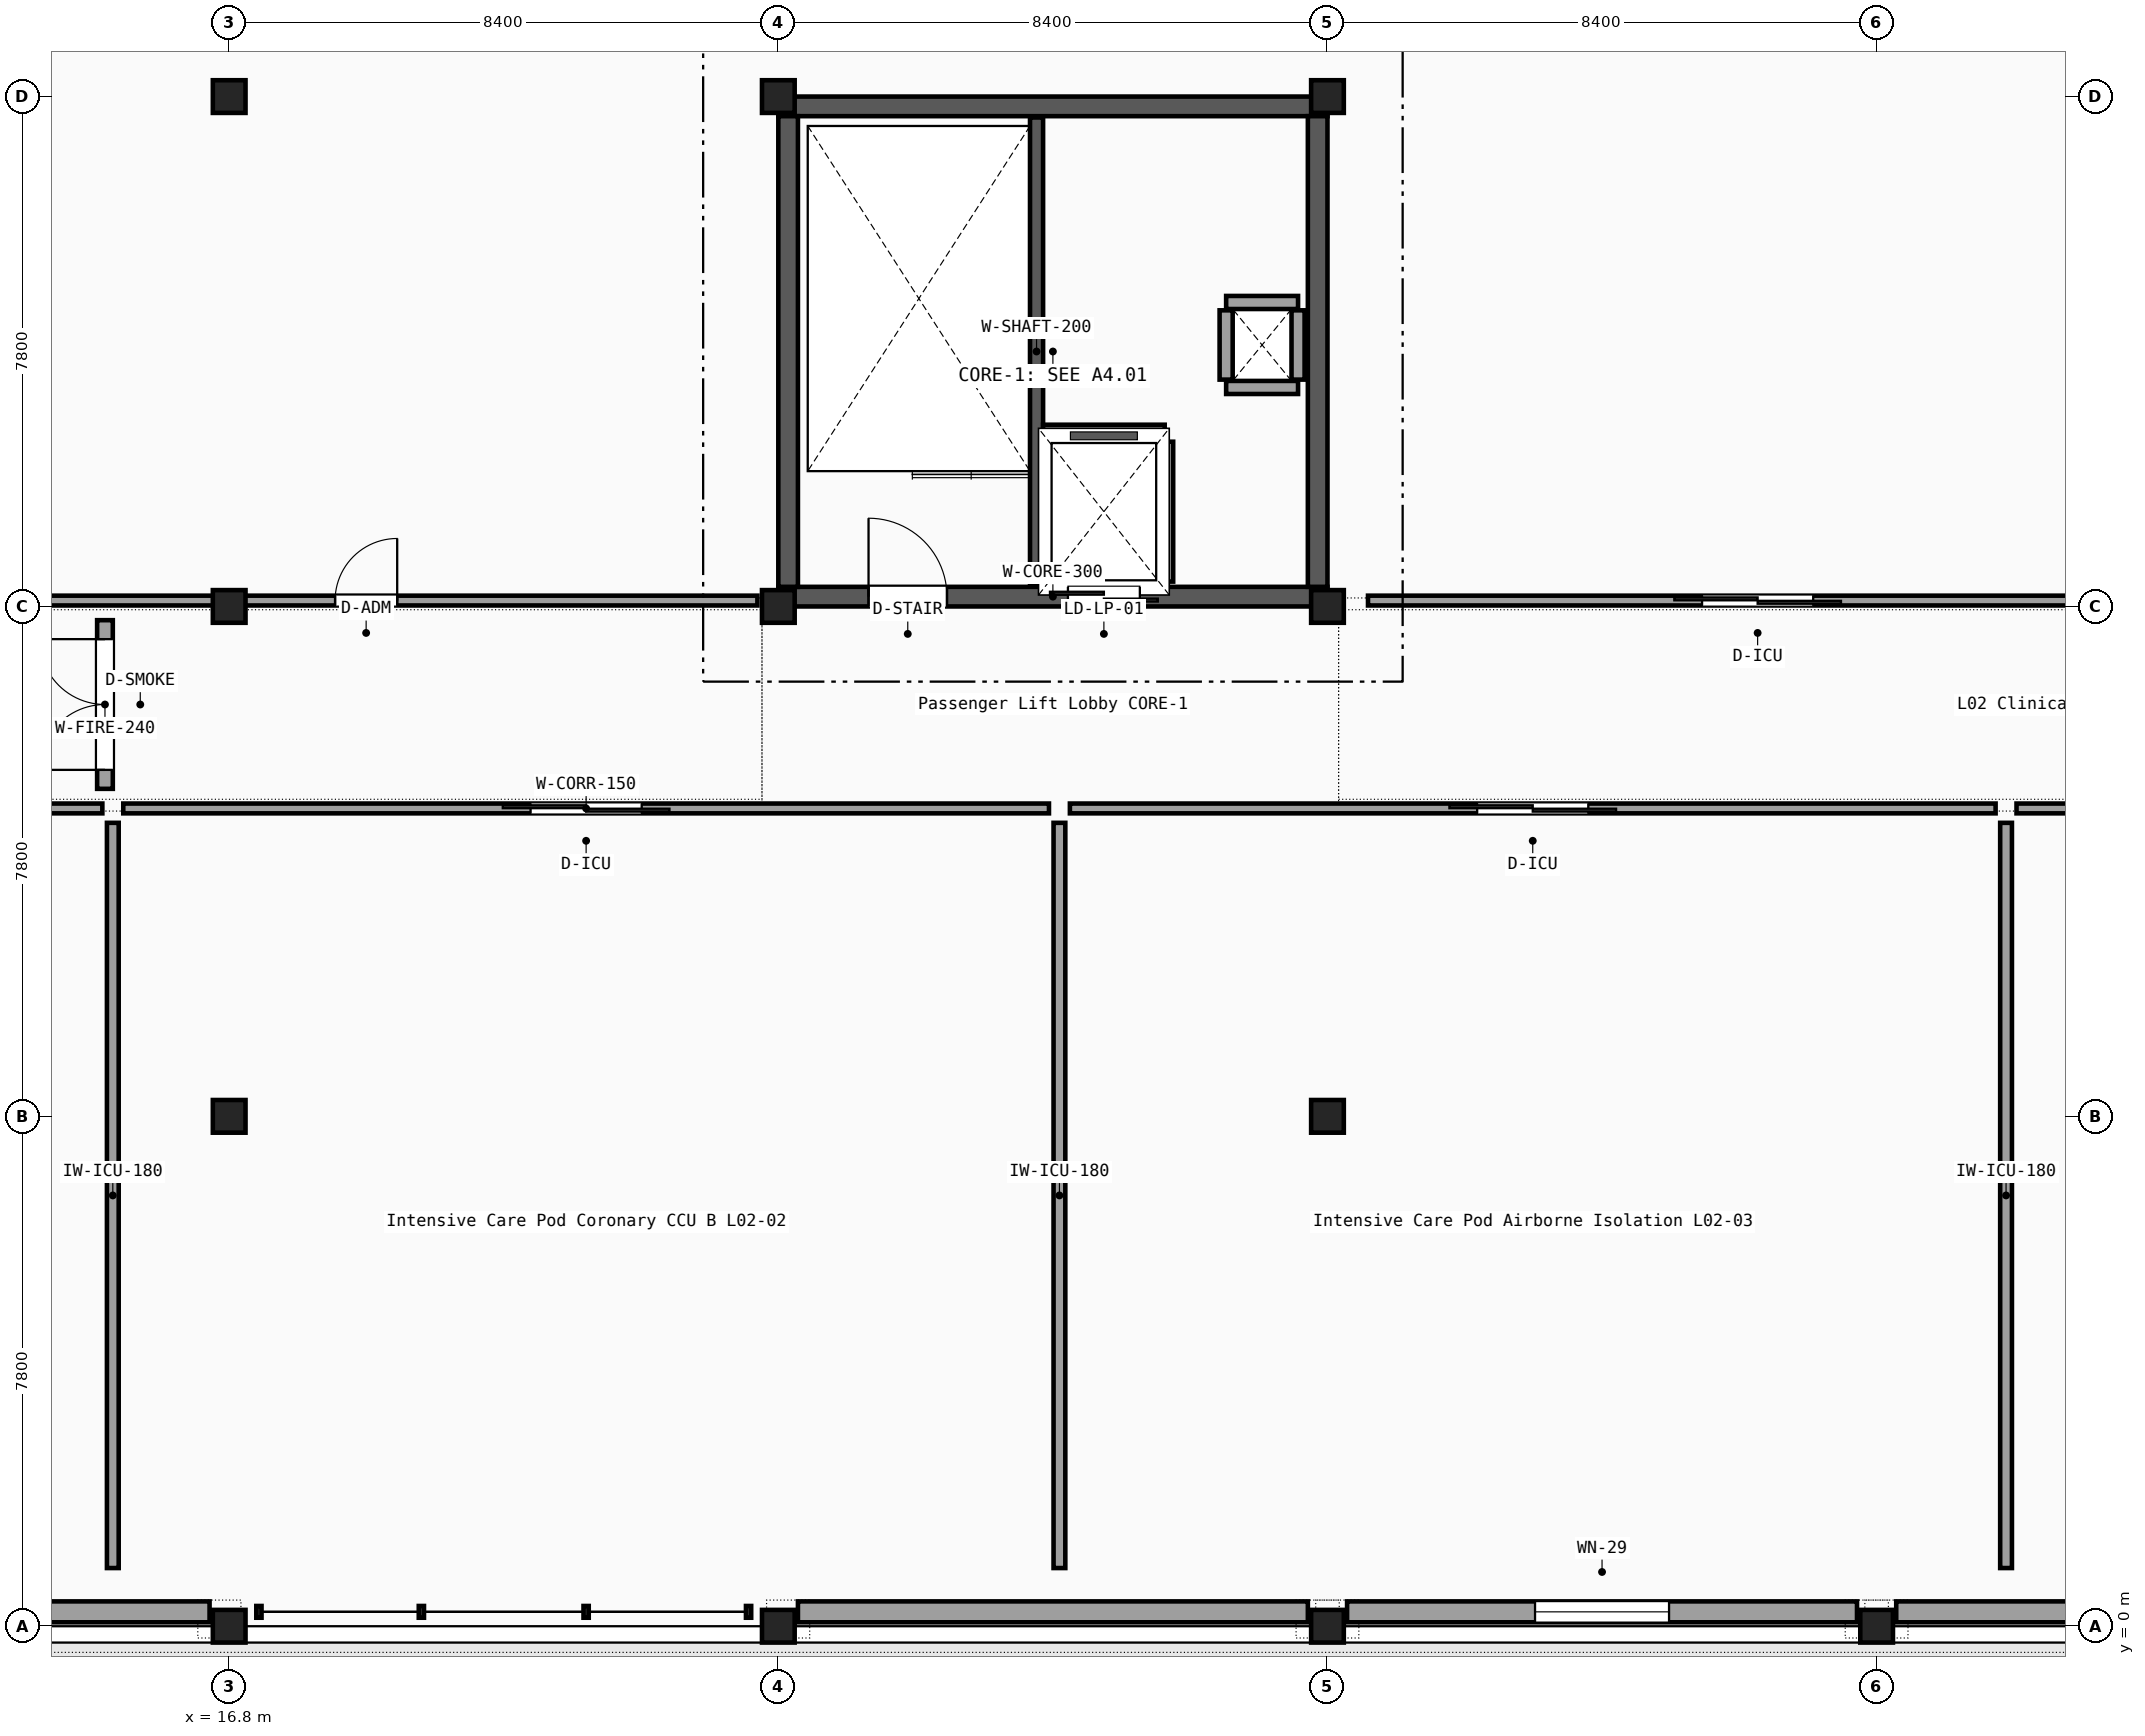
"""IFC4 building model, lengths in metres.
Left out: names, types, materials, properties, quantities, classifications, styles, units other than length and angle.
Written with IfcOpenShell. Run it as: python <this file> out.ifc"""

import sys

from ifc_helpers import new_model, si_unit, direction, frame, frame_2d, origin, origin_2d, place, context, subcontext, project, spatial, rectangle, extrude, element, fill, save


model = new_model("IFC4")
c1 = context("Model", 3, precision=1e-05, world=origin(), true_north=direction((0.0, 1.0)))
c2 = subcontext(c1, "Body", "Model", "MODEL_VIEW")
j1 = project(units=[si_unit("LENGTHUNIT", "METRE"), si_unit("PLANEANGLEUNIT", "RADIAN")], contexts=[c1])
p1 = place(None, origin())
s1 = spatial("IfcSite", under=j1, at=p1, CompositionType="ELEMENT")
p2 = place(p1, origin())
s2 = spatial("IfcBuilding", under=s1, at=p2, CompositionType="ELEMENT")
p3 = place(p2, frame((0.0, 0.0, 10.2)))
s3 = spatial("IfcBuildingStorey", under=s2, at=p3, CompositionType="ELEMENT", Elevation=10.2)
for number, where, z_axis, x_axis in (
    (1, (16.8, 0.0, 0.0), (0.0, 0.0, 1.0), (1.0, 0.0, 0.0)),
    (2, (16.8, 7.8, 0.0), (0.0, 0.0, 1.0), (1.0, 0.0, 0.0)),
    (3, (16.8, 15.6, 0.0), (0.0, 0.0, 1.0), (1.0, 0.0, 0.0)),
    (4, (16.8, 23.4, 0.0), (0.0, 0.0, 1.0), (1.0, 0.0, 0.0)),
    (5, (25.2, 0.0, 0.0), (0.0, 0.0, 1.0), (1.0, 0.0, 0.0)),
    (6, (25.2, 15.6, 0.0), (0.0, 0.0, 1.0), (1.0, 0.0, 0.0)),
    (7, (25.2, 23.4, 0.0), (0.0, 0.0, 1.0), (1.0, 0.0, 0.0)),
    (8, (33.6, 0.0, 0.0), (0.0, 0.0, 1.0), (1.0, 0.0, 0.0)),
    (9, (33.6, 7.8, 0.0), (0.0, 0.0, 1.0), (1.0, 0.0, 0.0)),
    (10, (33.6, 15.6, 0.0), (0.0, 0.0, 1.0), (1.0, 0.0, 0.0)),
    (11, (33.6, 23.4, 0.0), (0.0, 0.0, 1.0), (1.0, 0.0, 0.0)),
    (12, (42.0, 0.0, 0.0), (0.0, 0.0, 1.0), (1.0, 0.0, 0.0)),
):
    element("IfcColumn", number, at=place(p3, frame(where, z_axis=z_axis, x_axis=x_axis)), inside=s3, PredefinedType="COLUMN", context=c2, shape_type="SweptSolid", body=[
        extrude(rectangle(XDim=0.5, YDim=0.5, at=origin_2d()), origin(), (0.0, 0.0, 1.0), 4.65),
    ])
for number, where, z_axis, x_axis in (
    (13, (8.7, 0.22, 0.0), (0.0, 0.0, 1.0), (1.0, 0.0, 0.0)),
    (14, (25.5, 0.22, 0.0), (0.0, 0.0, 1.0), (1.0, 0.0, 0.0)),
):
    element("IfcWall", number, at=place(p3, frame(where, z_axis=z_axis, x_axis=x_axis)), inside=s3, PredefinedType="SOLIDWALL", context=c2, shape_type="SweptSolid", body=[
        extrude(rectangle(XDim=7.8, YDim=0.32, at=frame_2d((3.9, 0.0))), origin(), (0.0, 0.0, 1.0), 4.04),
    ])
p4 = place(p3, frame((33.9, 0.22, 0.0), z_axis=(0.0, 0.0, 1.0), x_axis=(1.0, 0.0, 0.0)))
e15 = element("IfcWall", 15, at=p4, inside=s3, PredefinedType="SOLIDWALL", context=c2, shape_type="SweptSolid", body=[
    extrude(rectangle(XDim=7.8, YDim=0.32, at=frame_2d((3.9, 0.0))), origin(), (0.0, 0.0, 1.0), 4.04),
])
p5 = place(p4, frame((2.875, 0.0, 1.05)))
e16 = element("IfcOpeningElement", 16, at=p5, cuts=e15, PredefinedType="OPENING", context=c2, shape_type="SweptSolid", body=[
    extrude(rectangle(XDim=2.05, YDim=1.4, at=frame_2d((1.025, 0.7))), frame((0.0, 0.17, 0.0), z_axis=(0.0, -1.0, 0.0), x_axis=(1.0, 0.0, 0.0)), (0.0, 0.0, 1.0), 0.34),
])
p6 = place(p3, frame((42.3, 0.22, 0.0), z_axis=(0.0, 0.0, 1.0), x_axis=(1.0, 0.0, 0.0)))
e17 = element("IfcWall", 17, at=p6, inside=s3, PredefinedType="SOLIDWALL", context=c2, shape_type="SweptSolid", body=[
    extrude(rectangle(XDim=7.8, YDim=0.32, at=frame_2d((3.9, 0.0))), origin(), (0.0, 0.0, 1.0), 4.37),
])
p7 = place(p3, frame((25.2, 15.75, 0.0), z_axis=(0.0, 0.0, 1.0), x_axis=(1.0, 0.0, 0.0)))
e18 = element("IfcWall", 18, at=p7, inside=s3, PredefinedType="SHEAR", context=c2, shape_type="SweptSolid", body=[
    extrude(rectangle(XDim=8.4, YDim=0.3, at=frame_2d((4.2, 0.0))), origin(), (0.0, 0.0, 1.0), 4.4),
])
p8 = place(p7, frame((1.38, 0.0, 0.0)))
e19 = element("IfcOpeningElement", 19, at=p8, cuts=e18, PredefinedType="OPENING", context=c2, shape_type="SweptSolid", body=[
    extrude(rectangle(XDim=1.2, YDim=2.15, at=frame_2d((0.6, 1.075))), frame((0.0, 0.16, 0.0), z_axis=(0.0, -1.0, 0.0), x_axis=(1.0, 0.0, 0.0)), (0.0, 0.0, 1.0), 0.32),
])
p9 = place(p7, frame((4.43, 0.0, 0.0)))
e20 = element("IfcOpeningElement", 20, at=p9, cuts=e18, PredefinedType="OPENING", context=c2, shape_type="SweptSolid", body=[
    extrude(rectangle(XDim=1.1, YDim=2.15, at=frame_2d((0.55, 1.075))), frame((0.0, 0.16, 0.0), z_axis=(0.0, -1.0, 0.0), x_axis=(1.0, 0.0, 0.0)), (0.0, 0.0, 1.0), 0.32),
])
p10 = place(p3, frame((25.2, 23.25, 0.0), z_axis=(0.0, 0.0, 1.0), x_axis=(1.0, 0.0, 0.0)))
e21 = element("IfcWall", 21, at=p10, inside=s3, PredefinedType="SHEAR", context=c2, shape_type="SweptSolid", body=[
    extrude(rectangle(XDim=8.4, YDim=0.3, at=frame_2d((4.2, 0.0))), origin(), (0.0, 0.0, 1.0), 4.4),
])
for number, where, z_axis, x_axis in (
    (22, (25.35, 15.9, 0.0), (0.0, 0.0, 1.0), (0.0, 1.0, 0.0)),
    (23, (33.45, 15.9, 0.0), (0.0, 0.0, 1.0), (0.0, 1.0, 0.0)),
):
    element("IfcWall", number, at=place(p3, frame(where, z_axis=z_axis, x_axis=x_axis)), inside=s3, PredefinedType="SHEAR", context=c2, shape_type="SweptSolid", body=[
        extrude(rectangle(XDim=7.2, YDim=0.3, at=frame_2d((3.6, 0.0))), origin(), (0.0, 0.0, 1.0), 4.4),
    ])
p11 = place(p3, frame((29.15, 15.92, 0.0), z_axis=(0.0, 0.0, 1.0), x_axis=(0.0, 1.0, 0.0)))
e24 = element("IfcWall", 24, at=p11, inside=s3, PredefinedType="SHEAR", context=c2, shape_type="SweptSolid", body=[
    extrude(rectangle(XDim=7.16, YDim=0.2, at=frame_2d((3.58, 0.0))), origin(), (0.0, 0.0, 1.0), 4.4),
])
for number, where, z_axis, x_axis in (
    (25, (32.05, 18.95, 0.0), (0.0, 0.0, 1.0), (1.0, 0.0, 0.0)),
    (26, (32.05, 20.25, 0.0), (0.0, 0.0, 1.0), (1.0, 0.0, 0.0)),
):
    element("IfcWall", number, at=place(p3, frame(where, z_axis=z_axis, x_axis=x_axis)), inside=s3, PredefinedType="PARTITIONING", context=c2, shape_type="SweptSolid", body=[
        extrude(rectangle(XDim=1.1, YDim=0.2, at=frame_2d((0.55, 0.0))), origin(), (0.0, 0.0, 1.0), 4.04),
    ])
for number, where, z_axis, x_axis in (
    (27, (32.05, 19.07, 0.0), (0.0, 0.0, 1.0), (0.0, 1.0, 0.0)),
    (28, (33.15, 19.07, 0.0), (0.0, 0.0, 1.0), (0.0, 1.0, 0.0)),
):
    element("IfcWall", number, at=place(p3, frame(where, z_axis=z_axis, x_axis=x_axis)), inside=s3, PredefinedType="PARTITIONING", context=c2, shape_type="SweptSolid", body=[
        extrude(rectangle(XDim=1.06, YDim=0.2, at=frame_2d((0.53, 0.0))), origin(), (0.0, 0.0, 1.0), 4.04),
    ])
p12 = place(p3, frame((31.14, 15.98, 0.0), z_axis=(0.0, 0.0, 1.0), x_axis=(0.0, 1.0, 0.0)))
e29 = element("IfcWall", 29, at=p12, inside=s3, PredefinedType="PARTITIONING", context=c2, shape_type="SweptSolid", body=[
    extrude(rectangle(XDim=2.14, YDim=0.2, at=frame_2d((1.07, 0.0))), origin(), (0.0, 0.0, 1.0), 4.04),
])
p13 = place(p3, frame((29.25, 18.28, 0.0), z_axis=(0.0, 0.0, 1.0), x_axis=(1.0, 0.0, 0.0)))
e30 = element("IfcWall", 30, at=p13, inside=s3, PredefinedType="PARTITIONING", context=c2, shape_type="SweptSolid", body=[
    extrude(rectangle(XDim=1.86, YDim=0.2, at=frame_2d((0.93, 0.0))), origin(), (0.0, 0.0, 1.0), 4.04),
])
p14 = place(p3, frame((0.62, 12.51, 0.0), z_axis=(0.0, 0.0, 1.0), x_axis=(1.0, 0.0, 0.0)))
e31 = element("IfcWall", 31, at=p14, inside=s3, PredefinedType="PARTITIONING", context=c2, shape_type="SweptSolid", body=[
    extrude(rectangle(XDim=14.24, YDim=0.15, at=frame_2d((7.12, 0.0))), origin(), (0.0, 0.0, 1.0), 4.37),
])
p15 = place(p14, frame((6.27, 0.0, 0.0)))
e32 = element("IfcOpeningElement", 32, at=p15, cuts=e31, PredefinedType="OPENING", context=c2, shape_type="SweptSolid", body=[
    extrude(rectangle(XDim=1.7, YDim=2.3, at=frame_2d((0.85, 1.15))), frame((0.0, 0.085, 0.0), z_axis=(0.0, -1.0, 0.0), x_axis=(1.0, 0.0, 0.0)), (0.0, 0.0, 1.0), 0.17),
])
p16 = place(p3, frame((15.02, 0.89, 0.0), z_axis=(0.0, 0.0, 1.0), x_axis=(0.0, 1.0, 0.0)))
e33 = element("IfcWall", 33, at=p16, inside=s3, PredefinedType="PARTITIONING", context=c2, shape_type="SweptSolid", body=[
    extrude(rectangle(XDim=11.4, YDim=0.18, at=frame_2d((5.7, 0.0))), origin(), (0.0, 0.0, 1.0), 4.37),
])
p17 = place(p3, frame((15.18, 12.51, 0.0), z_axis=(0.0, 0.0, 1.0), x_axis=(1.0, 0.0, 0.0)))
e34 = element("IfcWall", 34, at=p17, inside=s3, PredefinedType="PARTITIONING", context=c2, shape_type="SweptSolid", body=[
    extrude(rectangle(XDim=14.16, YDim=0.15, at=frame_2d((7.08, 0.0))), origin(), (0.0, 0.0, 1.0), 4.04),
])
p18 = place(p17, frame((6.23, 0.0, 0.0)))
e35 = element("IfcOpeningElement", 35, at=p18, cuts=e34, PredefinedType="OPENING", context=c2, shape_type="SweptSolid", body=[
    extrude(rectangle(XDim=1.7, YDim=2.3, at=frame_2d((0.85, 1.15))), frame((0.0, 0.085, 0.0), z_axis=(0.0, -1.0, 0.0), x_axis=(1.0, 0.0, 0.0)), (0.0, 0.0, 1.0), 0.17),
])
p19 = place(p3, frame((29.5, 0.89, 0.0), z_axis=(0.0, 0.0, 1.0), x_axis=(0.0, 1.0, 0.0)))
e36 = element("IfcWall", 36, at=p19, inside=s3, PredefinedType="PARTITIONING", context=c2, shape_type="SweptSolid", body=[
    extrude(rectangle(XDim=11.4, YDim=0.18, at=frame_2d((5.7, 0.0))), origin(), (0.0, 0.0, 1.0), 4.37),
])
p20 = place(p3, frame((29.66, 12.51, 0.0), z_axis=(0.0, 0.0, 1.0), x_axis=(1.0, 0.0, 0.0)))
e37 = element("IfcWall", 37, at=p20, inside=s3, PredefinedType="PARTITIONING", context=c2, shape_type="SweptSolid", body=[
    extrude(rectangle(XDim=14.16, YDim=0.15, at=frame_2d((7.08, 0.0))), origin(), (0.0, 0.0, 1.0), 4.04),
])
p21 = place(p20, frame((6.23, 0.0, 0.0)))
e38 = element("IfcOpeningElement", 38, at=p21, cuts=e37, PredefinedType="OPENING", context=c2, shape_type="SweptSolid", body=[
    extrude(rectangle(XDim=1.7, YDim=2.3, at=frame_2d((0.85, 1.15))), frame((0.0, 0.085, 0.0), z_axis=(0.0, -1.0, 0.0), x_axis=(1.0, 0.0, 0.0)), (0.0, 0.0, 1.0), 0.17),
])
p22 = place(p3, frame((43.98, 0.89, 0.0), z_axis=(0.0, 0.0, 1.0), x_axis=(0.0, 1.0, 0.0)))
e39 = element("IfcWall", 39, at=p22, inside=s3, PredefinedType="PARTITIONING", context=c2, shape_type="SweptSolid", body=[
    extrude(rectangle(XDim=11.4, YDim=0.18, at=frame_2d((5.7, 0.0))), origin(), (0.0, 0.0, 1.0), 4.37),
])
p23 = place(p3, frame((44.14, 12.51, 0.0), z_axis=(0.0, 0.0, 1.0), x_axis=(1.0, 0.0, 0.0)))
e40 = element("IfcWall", 40, at=p23, inside=s3, PredefinedType="PARTITIONING", context=c2, shape_type="SweptSolid", body=[
    extrude(rectangle(XDim=14.24, YDim=0.15, at=frame_2d((7.12, 0.0))), origin(), (0.0, 0.0, 1.0), 4.37),
])
p24 = place(p23, frame((6.595, 0.0, 0.0)))
e41 = element("IfcOpeningElement", 41, at=p24, cuts=e40, PredefinedType="OPENING", context=c2, shape_type="SweptSolid", body=[
    extrude(rectangle(XDim=1.05, YDim=2.15, at=frame_2d((0.525, 1.075))), frame((0.0, 0.085, 0.0), z_axis=(0.0, -1.0, 0.0), x_axis=(1.0, 0.0, 0.0)), (0.0, 0.0, 1.0), 0.17),
])
p25 = place(p3, frame((12.91, 15.69, 0.0), z_axis=(0.0, 0.0, 1.0), x_axis=(1.0, 0.0, 0.0)))
e42 = element("IfcWall", 42, at=p25, inside=s3, PredefinedType="PARTITIONING", context=c2, shape_type="SweptSolid", body=[
    extrude(rectangle(XDim=11.97, YDim=0.15, at=frame_2d((5.985, 0.0))), origin(), (0.0, 0.0, 1.0), 4.04),
])
p26 = place(p25, frame((5.51, 0.0, 0.0)))
e43 = element("IfcOpeningElement", 43, at=p26, cuts=e42, PredefinedType="OPENING", context=c2, shape_type="SweptSolid", body=[
    extrude(rectangle(XDim=0.95, YDim=2.1, at=frame_2d((0.475, 1.05))), frame((0.0, 0.085, 0.0), z_axis=(0.0, -1.0, 0.0), x_axis=(1.0, 0.0, 0.0)), (0.0, 0.0, 1.0), 0.17),
])
p27 = place(p3, frame((34.22, 15.69, 0.0), z_axis=(0.0, 0.0, 1.0), x_axis=(1.0, 0.0, 0.0)))
e44 = element("IfcWall", 44, at=p27, inside=s3, PredefinedType="PARTITIONING", context=c2, shape_type="SweptSolid", body=[
    extrude(rectangle(XDim=11.92, YDim=0.15, at=frame_2d((5.96, 0.0))), origin(), (0.0, 0.0, 1.0), 4.37),
])
p28 = place(p27, frame((5.11, 0.0, 0.0)))
e45 = element("IfcOpeningElement", 45, at=p28, cuts=e44, PredefinedType="OPENING", context=c2, shape_type="SweptSolid", body=[
    extrude(rectangle(XDim=1.7, YDim=2.3, at=frame_2d((0.85, 1.15))), frame((0.0, 0.085, 0.0), z_axis=(0.0, -1.0, 0.0), x_axis=(1.0, 0.0, 0.0)), (0.0, 0.0, 1.0), 0.17),
])
p29 = place(p3, frame((14.9, 12.81, 0.0), z_axis=(0.0, 0.0, 1.0), x_axis=(0.0, 1.0, 0.0)))
e46 = element("IfcWall", 46, at=p29, inside=s3, PredefinedType="PARTITIONING", context=c2, shape_type="SweptSolid", body=[
    extrude(rectangle(XDim=2.58, YDim=0.24, at=frame_2d((1.29, 0.0))), origin(), (0.0, 0.0, 1.0), 4.04),
])
p30 = place(p29, frame((0.29, 0.0, 0.0)))
e47 = element("IfcOpeningElement", 47, at=p30, cuts=e46, PredefinedType="OPENING", context=c2, shape_type="SweptSolid", body=[
    extrude(rectangle(XDim=2.0, YDim=2.3, at=frame_2d((1.0, 1.15))), frame((0.0, 0.13, 0.0), z_axis=(0.0, -1.0, 0.0), x_axis=(1.0, 0.0, 0.0)), (0.0, 0.0, 1.0), 0.26),
])
p31 = place(p5, origin())
e48 = element("IfcWindow", 48, at=p31, inside=s3, PartitioningType="SINGLE_PANEL", PredefinedType="WINDOW", context=c2, shape_type="SweptSolid", body=[
    extrude(rectangle(XDim=2.05, YDim=1.4, at=frame_2d((1.025, 0.7))), frame((0.0, 0.03, 0.0), z_axis=(0.0, -1.0, 0.0), x_axis=(1.0, 0.0, 0.0)), (0.0, 0.0, 1.0), 0.06),
])
fill(e16, e48)
p32 = place(p8, origin())
e49 = element("IfcDoor", 49, at=p32, inside=s3, OperationType="SINGLE_SWING_LEFT", PredefinedType="DOOR", context=c2, shape_type="SweptSolid", body=[
    extrude(rectangle(XDim=1.2, YDim=2.15, at=frame_2d((0.6, 1.075))), frame((0.0, 0.025, 0.0), z_axis=(0.0, -1.0, 0.0), x_axis=(1.0, 0.0, 0.0)), (0.0, 0.0, 1.0), 0.05),
])
fill(e19, e49)
p33 = place(p9, origin())
e50 = element("IfcDoor", 50, at=p33, inside=s3, OperationType="DOUBLE_DOOR_SLIDING", PredefinedType="DOOR", context=c2, shape_type="SweptSolid", body=[
    extrude(rectangle(XDim=1.1, YDim=2.15, at=frame_2d((0.55, 1.075))), frame((0.0, 0.025, 0.0), z_axis=(0.0, -1.0, 0.0), x_axis=(1.0, 0.0, 0.0)), (0.0, 0.0, 1.0), 0.05),
])
fill(e20, e50)
p34 = place(p18, origin())
e51 = element("IfcDoor", 51, at=p34, inside=s3, OperationType="DOUBLE_DOOR_SLIDING", PredefinedType="DOOR", context=c2, shape_type="SweptSolid", body=[
    extrude(rectangle(XDim=1.7, YDim=2.3, at=frame_2d((0.85, 1.15))), frame((0.0, 0.025, 0.0), z_axis=(0.0, -1.0, 0.0), x_axis=(1.0, 0.0, 0.0)), (0.0, 0.0, 1.0), 0.05),
])
fill(e35, e51)
p35 = place(p21, origin())
e52 = element("IfcDoor", 52, at=p35, inside=s3, OperationType="DOUBLE_DOOR_SLIDING", PredefinedType="DOOR", context=c2, shape_type="SweptSolid", body=[
    extrude(rectangle(XDim=1.7, YDim=2.3, at=frame_2d((0.85, 1.15))), frame((0.0, 0.025, 0.0), z_axis=(0.0, -1.0, 0.0), x_axis=(1.0, 0.0, 0.0)), (0.0, 0.0, 1.0), 0.05),
])
fill(e38, e52)
p36 = place(p26, origin())
e53 = element("IfcDoor", 53, at=p36, inside=s3, OperationType="SINGLE_SWING_RIGHT", PredefinedType="DOOR", context=c2, shape_type="SweptSolid", body=[
    extrude(rectangle(XDim=0.95, YDim=2.1, at=frame_2d((0.475, 1.05))), frame((0.0, 0.025, 0.0), z_axis=(0.0, -1.0, 0.0), x_axis=(1.0, 0.0, 0.0)), (0.0, 0.0, 1.0), 0.05),
])
fill(e43, e53)
p37 = place(p28, origin())
e54 = element("IfcDoor", 54, at=p37, inside=s3, OperationType="DOUBLE_DOOR_SLIDING", PredefinedType="DOOR", context=c2, shape_type="SweptSolid", body=[
    extrude(rectangle(XDim=1.7, YDim=2.3, at=frame_2d((0.85, 1.15))), frame((0.0, 0.025, 0.0), z_axis=(0.0, -1.0, 0.0), x_axis=(1.0, 0.0, 0.0)), (0.0, 0.0, 1.0), 0.05),
])
fill(e45, e54)
p38 = place(p30, origin())
e55 = element("IfcDoor", 55, at=p38, inside=s3, OperationType="DOUBLE_SWING_LEFT", PredefinedType="DOOR", context=c2, shape_type="SweptSolid", body=[
    extrude(rectangle(XDim=2.0, YDim=2.3, at=frame_2d((1.0, 1.15))), frame((0.0, 0.025, 0.0), z_axis=(0.0, -1.0, 0.0), x_axis=(1.0, 0.0, 0.0)), (0.0, 0.0, 1.0), 0.05),
])
fill(e47, e55)
save(model, sys.argv[1])
